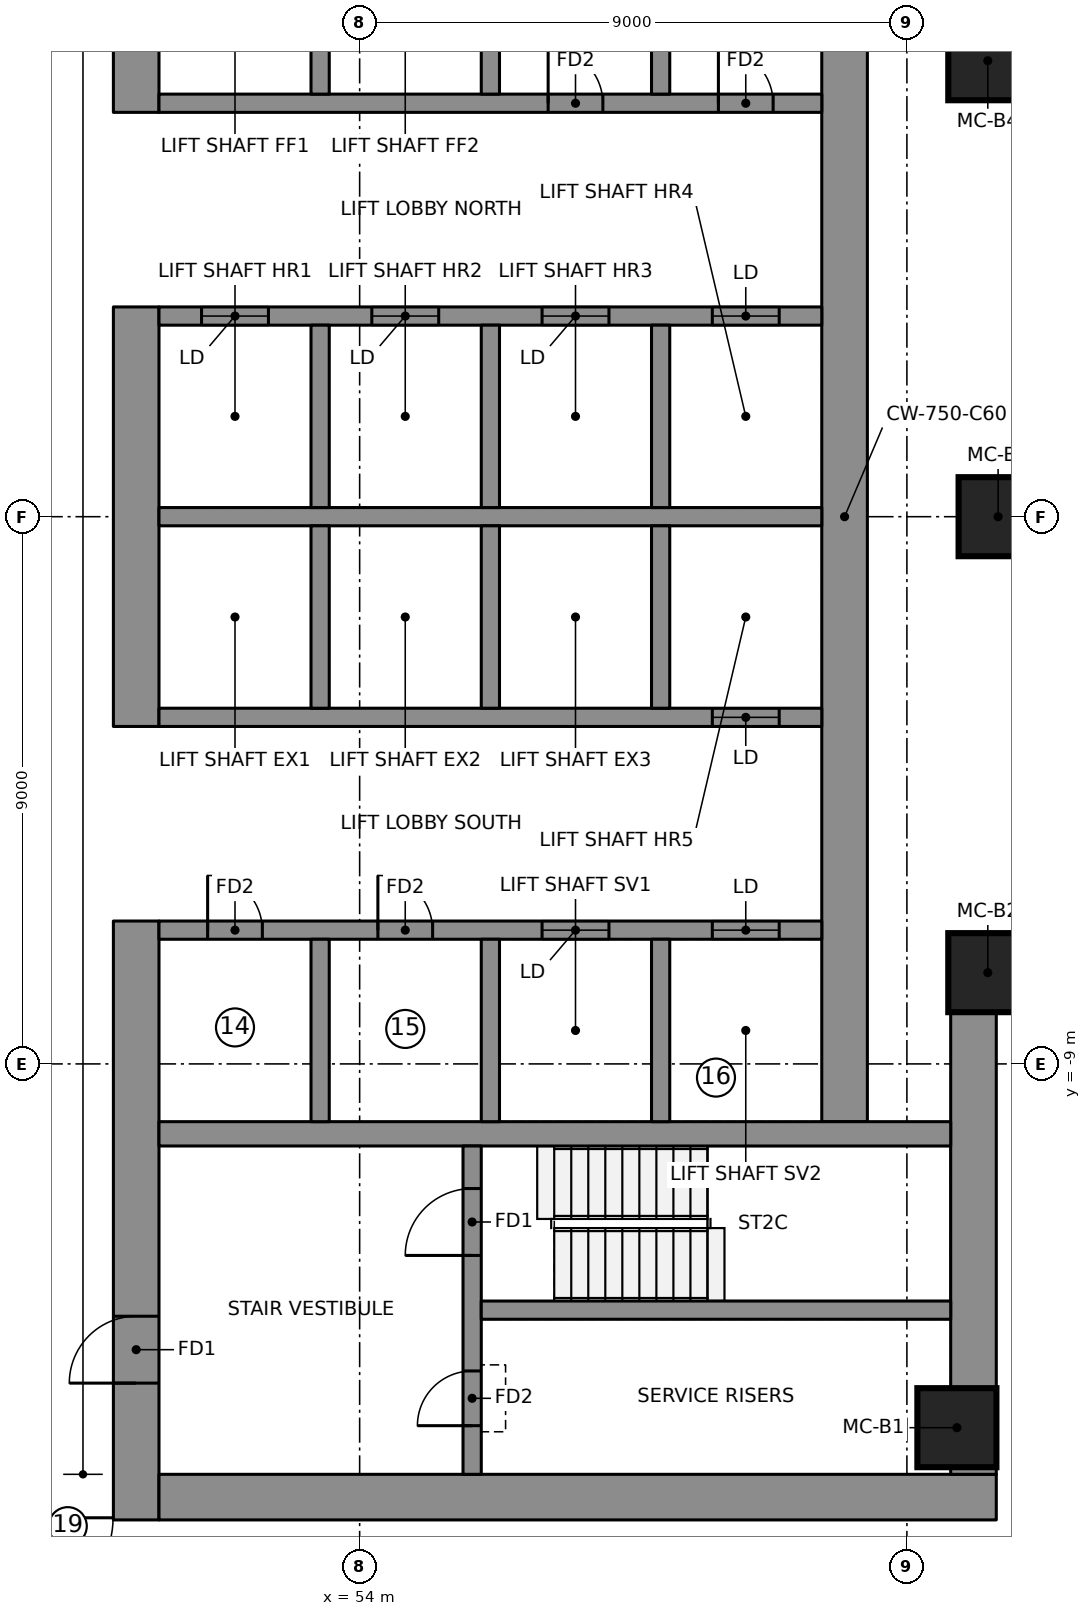
"""IFC4 building model, lengths in metres.
Left out: names, types, materials, properties, quantities, classifications, styles, units other than length and angle.
Written with IfcOpenShell. Run it as: python <this file> out.ifc"""

import sys

from ifc_helpers import new_model, si_unit, direction, frame, frame_2d, origin, origin_2d, place, context, subcontext, project, spatial, rectangle, extrude, element, fill, save


model = new_model("IFC4")
c1 = context("Model", 3, precision=1e-05, world=origin(), true_north=direction((0.0, 1.0)))
c2 = subcontext(c1, "Body", "Model", "MODEL_VIEW")
j1 = project(units=[si_unit("LENGTHUNIT", "METRE"), si_unit("PLANEANGLEUNIT", "RADIAN")], contexts=[c1])
p1 = place(None, origin())
s1 = spatial("IfcSite", under=j1, at=p1, CompositionType="ELEMENT")
p2 = place(p1, origin())
s2 = spatial("IfcBuilding", under=s1, at=p2, CompositionType="ELEMENT")
p3 = place(p2, frame((0.0, 0.0, 186.15)))
s3 = spatial("IfcBuildingStorey", under=s2, at=p3, CompositionType="ELEMENT", Elevation=186.15)
p4 = place(p3, frame((50.325, 6.65, 0.0), z_axis=(0.0, 0.0, 1.0), x_axis=(0.0, 1.0, 0.0)))
e1 = element("IfcWall", 1, at=p4, inside=s3, PredefinedType="SHEAR", context=c2, shape_type="SweptSolid", body=[
    extrude(rectangle(XDim=9.85, YDim=0.75, at=frame_2d((4.925, 0.0))), origin(), (0.0, 0.0, 1.0), 3.55),
])
p5 = place(p4, frame((6.5, 0.0, 0.0)))
e2 = element("IfcOpeningElement", 2, at=p5, cuts=e1, PredefinedType="OPENING", context=c2, shape_type="SweptSolid", body=[
    extrude(rectangle(XDim=1.1, YDim=2.1, at=frame_2d((0.55, 1.05))), frame((0.0, 0.385, 0.0), z_axis=(0.0, -1.0, 0.0), x_axis=(1.0, 0.0, 0.0)), (0.0, 0.0, 1.0), 0.77),
])
p6 = place(p3, frame((50.325, -3.45, 0.0), z_axis=(0.0, 0.0, 1.0), x_axis=(0.0, 1.0, 0.0)))
e3 = element("IfcWall", 3, at=p6, inside=s3, PredefinedType="SHEAR", context=c2, shape_type="SweptSolid", body=[
    extrude(rectangle(XDim=6.9, YDim=0.75, at=frame_2d((3.45, 0.0))), origin(), (0.0, 0.0, 1.0), 3.55),
])
p7 = place(p3, frame((50.325, -16.5, 0.0), z_axis=(0.0, 0.0, 1.0), x_axis=(0.0, 1.0, 0.0)))
e4 = element("IfcWall", 4, at=p7, inside=s3, PredefinedType="SHEAR", context=c2, shape_type="SweptSolid", body=[
    extrude(rectangle(XDim=9.85, YDim=0.75, at=frame_2d((4.925, 0.0))), origin(), (0.0, 0.0, 1.0), 3.55),
])
p8 = place(p7, frame((2.25, 0.0, 0.0)))
e5 = element("IfcOpeningElement", 5, at=p8, cuts=e4, PredefinedType="OPENING", context=c2, shape_type="SweptSolid", body=[
    extrude(rectangle(XDim=1.1, YDim=2.1, at=frame_2d((0.55, 1.05))), frame((0.0, 0.385, 0.0), z_axis=(0.0, -1.0, 0.0), x_axis=(1.0, 0.0, 0.0)), (0.0, 0.0, 1.0), 0.77),
])
p9 = place(p3, frame((50.7, -16.125, 0.0), z_axis=(0.0, 0.0, 1.0), x_axis=(1.0, 0.0, 0.0)))
e6 = element("IfcWall", 6, at=p9, inside=s3, PredefinedType="SHEAR", context=c2, shape_type="SweptSolid", body=[
    extrude(rectangle(XDim=13.77, YDim=0.75, at=frame_2d((6.885, 0.0))), origin(), (0.0, 0.0, 1.0), 3.55),
])
p10 = place(p3, frame((64.095, -15.75, 0.0), z_axis=(0.0, 0.0, 1.0), x_axis=(0.0, 1.0, 0.0)))
e7 = element("IfcWall", 7, at=p10, inside=s3, PredefinedType="SHEAR", context=c2, shape_type="SweptSolid", body=[
    extrude(rectangle(XDim=7.651, YDim=0.75, at=frame_2d((3.825, 0.0))), origin(), (0.0, 0.0, 1.0), 3.55),
])
p11 = place(p3, frame((61.975, -9.95, 0.0), z_axis=(0.0, 0.0, 1.0), x_axis=(0.0, 1.0, 0.0)))
e8 = element("IfcWall", 8, at=p11, inside=s3, PredefinedType="SHEAR", context=c2, shape_type="SweptSolid", body=[
    extrude(rectangle(XDim=19.9, YDim=0.75, at=frame_2d((9.95, 0.0))), origin(), (0.0, 0.0, 1.0), 3.55),
])
p12 = place(p3, frame((50.7, -10.15, 0.0), z_axis=(0.0, 0.0, 1.0), x_axis=(1.0, 0.0, 0.0)))
e9 = element("IfcWall", 9, at=p12, inside=s3, PredefinedType="SHEAR", context=c2, shape_type="SweptSolid", body=[
    extrude(rectangle(XDim=13.02, YDim=0.4, at=frame_2d((6.51, 0.0))), origin(), (0.0, 0.0, 1.0), 3.55),
])
p13 = place(p3, frame((50.7, 0.0, 0.0), z_axis=(0.0, 0.0, 1.0), x_axis=(1.0, 0.0, 0.0)))
e10 = element("IfcWall", 10, at=p13, inside=s3, PredefinedType="SHEAR", context=c2, shape_type="SweptSolid", body=[
    extrude(rectangle(XDim=10.9, YDim=0.3, at=frame_2d((5.45, 0.0))), origin(), (0.0, 0.0, 1.0), 3.55),
])
p14 = place(p3, frame((50.7, 3.3, 0.0), z_axis=(0.0, 0.0, 1.0), x_axis=(1.0, 0.0, 0.0)))
e11 = element("IfcWall", 11, at=p14, inside=s3, PredefinedType="SHEAR", context=c2, shape_type="SweptSolid", body=[
    extrude(rectangle(XDim=10.9, YDim=0.3, at=frame_2d((5.45, 0.0))), origin(), (0.0, 0.0, 1.0), 3.55),
])
p15 = place(p14, frame((0.7, 0.0, 0.0)))
e12 = element("IfcOpeningElement", 12, at=p15, cuts=e11, PredefinedType="OPENING", context=c2, shape_type="SweptSolid", body=[
    extrude(rectangle(XDim=1.1, YDim=2.1, at=frame_2d((0.55, 1.05))), frame((0.0, 0.16, 0.0), z_axis=(0.0, -1.0, 0.0), x_axis=(1.0, 0.0, 0.0)), (0.0, 0.0, 1.0), 0.32),
])
p16 = place(p14, frame((3.5, 0.0, 0.0)))
e13 = element("IfcOpeningElement", 13, at=p16, cuts=e11, PredefinedType="OPENING", context=c2, shape_type="SweptSolid", body=[
    extrude(rectangle(XDim=1.1, YDim=2.1, at=frame_2d((0.55, 1.05))), frame((0.0, 0.16, 0.0), z_axis=(0.0, -1.0, 0.0), x_axis=(1.0, 0.0, 0.0)), (0.0, 0.0, 1.0), 0.32),
])
p17 = place(p14, frame((6.3, 0.0, 0.0)))
e14 = element("IfcOpeningElement", 14, at=p17, cuts=e11, PredefinedType="OPENING", context=c2, shape_type="SweptSolid", body=[
    extrude(rectangle(XDim=1.1, YDim=2.1, at=frame_2d((0.55, 1.05))), frame((0.0, 0.16, 0.0), z_axis=(0.0, -1.0, 0.0), x_axis=(1.0, 0.0, 0.0)), (0.0, 0.0, 1.0), 0.32),
])
p18 = place(p14, frame((9.1, 0.0, 0.0)))
e15 = element("IfcOpeningElement", 15, at=p18, cuts=e11, PredefinedType="OPENING", context=c2, shape_type="SweptSolid", body=[
    extrude(rectangle(XDim=1.1, YDim=2.1, at=frame_2d((0.55, 1.05))), frame((0.0, 0.16, 0.0), z_axis=(0.0, -1.0, 0.0), x_axis=(1.0, 0.0, 0.0)), (0.0, 0.0, 1.0), 0.32),
])
p19 = place(p3, frame((50.7, 6.8, 0.0), z_axis=(0.0, 0.0, 1.0), x_axis=(1.0, 0.0, 0.0)))
e16 = element("IfcWall", 16, at=p19, inside=s3, PredefinedType="SHEAR", context=c2, shape_type="SweptSolid", body=[
    extrude(rectangle(XDim=10.9, YDim=0.3, at=frame_2d((5.45, 0.0))), origin(), (0.0, 0.0, 1.0), 3.55),
])
p20 = place(p19, frame((6.4, 0.0, 0.0)))
e17 = element("IfcOpeningElement", 17, at=p20, cuts=e16, PredefinedType="OPENING", context=c2, shape_type="SweptSolid", body=[
    extrude(rectangle(XDim=0.9, YDim=2.1, at=frame_2d((0.45, 1.05))), frame((0.0, 0.16, 0.0), z_axis=(0.0, -1.0, 0.0), x_axis=(1.0, 0.0, 0.0)), (0.0, 0.0, 1.0), 0.32),
])
p21 = place(p19, frame((9.2, 0.0, 0.0)))
e18 = element("IfcOpeningElement", 18, at=p21, cuts=e16, PredefinedType="OPENING", context=c2, shape_type="SweptSolid", body=[
    extrude(rectangle(XDim=0.9, YDim=2.1, at=frame_2d((0.45, 1.05))), frame((0.0, 0.16, 0.0), z_axis=(0.0, -1.0, 0.0), x_axis=(1.0, 0.0, 0.0)), (0.0, 0.0, 1.0), 0.32),
])
for number, where, z_axis, x_axis in (
    (19, (53.35, 0.15, 0.0), (0.0, 0.0, 1.0), (0.0, 1.0, 0.0)),
    (20, (53.35, 6.95, 0.0), (0.0, 0.0, 1.0), (0.0, 1.0, 0.0)),
    (21, (56.15, 0.15, 0.0), (0.0, 0.0, 1.0), (0.0, 1.0, 0.0)),
    (22, (56.15, 6.95, 0.0), (0.0, 0.0, 1.0), (0.0, 1.0, 0.0)),
    (23, (58.95, 0.15, 0.0), (0.0, 0.0, 1.0), (0.0, 1.0, 0.0)),
    (24, (58.95, 6.95, 0.0), (0.0, 0.0, 1.0), (0.0, 1.0, 0.0)),
):
    element("IfcWall", number, at=place(p3, frame(where, z_axis=z_axis, x_axis=x_axis)), inside=s3, PredefinedType="SHEAR", context=c2, shape_type="SweptSolid", body=[
        extrude(rectangle(XDim=3.0, YDim=0.3, at=frame_2d((1.5, 0.0))), origin(), (0.0, 0.0, 1.0), 3.55),
    ])
p22 = place(p3, frame((50.7, -3.3, 0.0), z_axis=(0.0, 0.0, 1.0), x_axis=(1.0, 0.0, 0.0)))
e25 = element("IfcWall", 25, at=p22, inside=s3, PredefinedType="SHEAR", context=c2, shape_type="SweptSolid", body=[
    extrude(rectangle(XDim=10.9, YDim=0.3, at=frame_2d((5.45, 0.0))), origin(), (0.0, 0.0, 1.0), 3.55),
])
p23 = place(p22, frame((9.1, 0.0, 0.0)))
e26 = element("IfcOpeningElement", 26, at=p23, cuts=e25, PredefinedType="OPENING", context=c2, shape_type="SweptSolid", body=[
    extrude(rectangle(XDim=1.1, YDim=2.1, at=frame_2d((0.55, 1.05))), frame((0.0, 0.16, 0.0), z_axis=(0.0, -1.0, 0.0), x_axis=(1.0, 0.0, 0.0)), (0.0, 0.0, 1.0), 0.32),
])
p24 = place(p3, frame((50.7, -6.8, 0.0), z_axis=(0.0, 0.0, 1.0), x_axis=(1.0, 0.0, 0.0)))
e27 = element("IfcWall", 27, at=p24, inside=s3, PredefinedType="SHEAR", context=c2, shape_type="SweptSolid", body=[
    extrude(rectangle(XDim=10.9, YDim=0.3, at=frame_2d((5.45, 0.0))), origin(), (0.0, 0.0, 1.0), 3.55),
])
p25 = place(p24, frame((6.3, 0.0, 0.0)))
e28 = element("IfcOpeningElement", 28, at=p25, cuts=e27, PredefinedType="OPENING", context=c2, shape_type="SweptSolid", body=[
    extrude(rectangle(XDim=1.1, YDim=2.1, at=frame_2d((0.55, 1.05))), frame((0.0, 0.16, 0.0), z_axis=(0.0, -1.0, 0.0), x_axis=(1.0, 0.0, 0.0)), (0.0, 0.0, 1.0), 0.32),
])
p26 = place(p24, frame((9.1, 0.0, 0.0)))
e29 = element("IfcOpeningElement", 29, at=p26, cuts=e27, PredefinedType="OPENING", context=c2, shape_type="SweptSolid", body=[
    extrude(rectangle(XDim=1.1, YDim=2.1, at=frame_2d((0.55, 1.05))), frame((0.0, 0.16, 0.0), z_axis=(0.0, -1.0, 0.0), x_axis=(1.0, 0.0, 0.0)), (0.0, 0.0, 1.0), 0.32),
])
p27 = place(p24, frame((0.8, 0.0, 0.0)))
e30 = element("IfcOpeningElement", 30, at=p27, cuts=e27, PredefinedType="OPENING", context=c2, shape_type="SweptSolid", body=[
    extrude(rectangle(XDim=0.9, YDim=2.1, at=frame_2d((0.45, 1.05))), frame((0.0, 0.16, 0.0), z_axis=(0.0, -1.0, 0.0), x_axis=(1.0, 0.0, 0.0)), (0.0, 0.0, 1.0), 0.32),
])
p28 = place(p24, frame((3.6, 0.0, 0.0)))
e31 = element("IfcOpeningElement", 31, at=p28, cuts=e27, PredefinedType="OPENING", context=c2, shape_type="SweptSolid", body=[
    extrude(rectangle(XDim=0.9, YDim=2.1, at=frame_2d((0.45, 1.05))), frame((0.0, 0.16, 0.0), z_axis=(0.0, -1.0, 0.0), x_axis=(1.0, 0.0, 0.0)), (0.0, 0.0, 1.0), 0.32),
])
for number, where, z_axis, x_axis in (
    (32, (53.35, -3.15, 0.0), (0.0, 0.0, 1.0), (0.0, 1.0, 0.0)),
    (33, (53.35, -9.95, 0.0), (0.0, 0.0, 1.0), (0.0, 1.0, 0.0)),
    (34, (56.15, -3.15, 0.0), (0.0, 0.0, 1.0), (0.0, 1.0, 0.0)),
    (35, (56.15, -9.95, 0.0), (0.0, 0.0, 1.0), (0.0, 1.0, 0.0)),
    (36, (58.95, -3.15, 0.0), (0.0, 0.0, 1.0), (0.0, 1.0, 0.0)),
    (37, (58.95, -9.95, 0.0), (0.0, 0.0, 1.0), (0.0, 1.0, 0.0)),
):
    element("IfcWall", number, at=place(p3, frame(where, z_axis=z_axis, x_axis=x_axis)), inside=s3, PredefinedType="SHEAR", context=c2, shape_type="SweptSolid", body=[
        extrude(rectangle(XDim=3.0, YDim=0.3, at=frame_2d((1.5, 0.0))), origin(), (0.0, 0.0, 1.0), 3.55),
    ])
p29 = place(p3, frame((55.85, -15.75, 0.0), z_axis=(0.0, 0.0, 1.0), x_axis=(0.0, 1.0, 0.0)))
e38 = element("IfcWall", 38, at=p29, inside=s3, PredefinedType="SHEAR", context=c2, shape_type="SweptSolid", body=[
    extrude(rectangle(XDim=5.4, YDim=0.3, at=frame_2d((2.7, 0.0))), origin(), (0.0, 0.0, 1.0), 3.55),
])
p30 = place(p29, frame((3.6, 0.0, 0.0)))
e39 = element("IfcOpeningElement", 39, at=p30, cuts=e38, PredefinedType="OPENING", context=c2, shape_type="SweptSolid", body=[
    extrude(rectangle(XDim=1.1, YDim=2.1, at=frame_2d((0.55, 1.05))), frame((0.0, 0.16, 0.0), z_axis=(0.0, -1.0, 0.0), x_axis=(1.0, 0.0, 0.0)), (0.0, 0.0, 1.0), 0.32),
])
p31 = place(p29, frame((0.8, 0.0, 0.0)))
e40 = element("IfcOpeningElement", 40, at=p31, cuts=e38, PredefinedType="OPENING", context=c2, shape_type="SweptSolid", body=[
    extrude(rectangle(XDim=0.9, YDim=2.1, at=frame_2d((0.45, 1.05))), frame((0.0, 0.16, 0.0), z_axis=(0.0, -1.0, 0.0), x_axis=(1.0, 0.0, 0.0)), (0.0, 0.0, 1.0), 0.32),
])
p32 = place(p3, frame((56.0, -13.05, 0.0), z_axis=(0.0, 0.0, 1.0), x_axis=(1.0, 0.0, 0.0)))
e41 = element("IfcWall", 41, at=p32, inside=s3, PredefinedType="SHEAR", context=c2, shape_type="SweptSolid", body=[
    extrude(rectangle(XDim=7.72, YDim=0.3, at=frame_2d((3.86, 0.0))), origin(), (0.0, 0.0, 1.0), 3.55),
])
for number, where, z_axis, x_axis in (
    (42, (63.822, -14.983, 0.0), (0.0, 0.0, 1.0), (1.0, 0.0, 0.0)),
    (43, (64.33, -7.499, 0.0), (0.0, 0.0, 1.0), (1.0, 0.0, 0.0)),
    (44, (64.5, 0.0, 0.0), (0.0, 0.0, 1.0), (1.0, 0.0, 0.0)),
    (45, (64.33, 7.499, 0.0), (0.0, 0.0, 1.0), (1.0, 0.0, 0.0)),
):
    element("IfcColumn", number, at=place(p3, frame(where, z_axis=z_axis, x_axis=x_axis)), inside=s3, PredefinedType="COLUMN", context=c2, shape_type="SweptSolid", body=[
        extrude(rectangle(XDim=1.3, YDim=1.3, at=origin_2d()), origin(), (0.0, 0.0, 1.0), 3.55),
    ])
p33 = place(p15, origin())
e46 = element("IfcDoor", 46, at=p33, inside=s3, OperationType="DOUBLE_DOOR_SLIDING", PredefinedType="DOOR", context=c2, shape_type="SweptSolid", body=[
    extrude(rectangle(XDim=1.1, YDim=2.1, at=frame_2d((0.55, 1.05))), frame((0.0, 0.025, 0.0), z_axis=(0.0, -1.0, 0.0), x_axis=(1.0, 0.0, 0.0)), (0.0, 0.0, 1.0), 0.05),
])
fill(e12, e46)
p34 = place(p16, origin())
e47 = element("IfcDoor", 47, at=p34, inside=s3, OperationType="DOUBLE_DOOR_SLIDING", PredefinedType="DOOR", context=c2, shape_type="SweptSolid", body=[
    extrude(rectangle(XDim=1.1, YDim=2.1, at=frame_2d((0.55, 1.05))), frame((0.0, 0.025, 0.0), z_axis=(0.0, -1.0, 0.0), x_axis=(1.0, 0.0, 0.0)), (0.0, 0.0, 1.0), 0.05),
])
fill(e13, e47)
p35 = place(p17, origin())
e48 = element("IfcDoor", 48, at=p35, inside=s3, OperationType="DOUBLE_DOOR_SLIDING", PredefinedType="DOOR", context=c2, shape_type="SweptSolid", body=[
    extrude(rectangle(XDim=1.1, YDim=2.1, at=frame_2d((0.55, 1.05))), frame((0.0, 0.025, 0.0), z_axis=(0.0, -1.0, 0.0), x_axis=(1.0, 0.0, 0.0)), (0.0, 0.0, 1.0), 0.05),
])
fill(e14, e48)
p36 = place(p18, origin())
e49 = element("IfcDoor", 49, at=p36, inside=s3, OperationType="DOUBLE_DOOR_SLIDING", PredefinedType="DOOR", context=c2, shape_type="SweptSolid", body=[
    extrude(rectangle(XDim=1.1, YDim=2.1, at=frame_2d((0.55, 1.05))), frame((0.0, 0.025, 0.0), z_axis=(0.0, -1.0, 0.0), x_axis=(1.0, 0.0, 0.0)), (0.0, 0.0, 1.0), 0.05),
])
fill(e15, e49)
p37 = place(p23, origin())
e50 = element("IfcDoor", 50, at=p37, inside=s3, OperationType="DOUBLE_DOOR_SLIDING", PredefinedType="DOOR", context=c2, shape_type="SweptSolid", body=[
    extrude(rectangle(XDim=1.1, YDim=2.1, at=frame_2d((0.55, 1.05))), frame((0.0, 0.025, 0.0), z_axis=(0.0, -1.0, 0.0), x_axis=(1.0, 0.0, 0.0)), (0.0, 0.0, 1.0), 0.05),
])
fill(e26, e50)
p38 = place(p25, origin())
e51 = element("IfcDoor", 51, at=p38, inside=s3, OperationType="DOUBLE_DOOR_SLIDING", PredefinedType="DOOR", context=c2, shape_type="SweptSolid", body=[
    extrude(rectangle(XDim=1.1, YDim=2.1, at=frame_2d((0.55, 1.05))), frame((0.0, 0.025, 0.0), z_axis=(0.0, -1.0, 0.0), x_axis=(1.0, 0.0, 0.0)), (0.0, 0.0, 1.0), 0.05),
])
fill(e28, e51)
p39 = place(p26, origin())
e52 = element("IfcDoor", 52, at=p39, inside=s3, OperationType="DOUBLE_DOOR_SLIDING", PredefinedType="DOOR", context=c2, shape_type="SweptSolid", body=[
    extrude(rectangle(XDim=1.1, YDim=2.1, at=frame_2d((0.55, 1.05))), frame((0.0, 0.025, 0.0), z_axis=(0.0, -1.0, 0.0), x_axis=(1.0, 0.0, 0.0)), (0.0, 0.0, 1.0), 0.05),
])
fill(e29, e52)
p40 = place(p30, origin())
e53 = element("IfcDoor", 53, at=p40, inside=s3, OperationType="SINGLE_SWING_RIGHT", PredefinedType="DOOR", context=c2, shape_type="SweptSolid", body=[
    extrude(rectangle(XDim=1.1, YDim=2.1, at=frame_2d((0.55, 1.05))), frame((0.0, 0.025, 0.0), z_axis=(0.0, -1.0, 0.0), x_axis=(1.0, 0.0, 0.0)), (0.0, 0.0, 1.0), 0.05),
])
fill(e39, e53)
p41 = place(p8, origin())
e54 = element("IfcDoor", 54, at=p41, inside=s3, OperationType="SINGLE_SWING_RIGHT", PredefinedType="DOOR", context=c2, shape_type="SweptSolid", body=[
    extrude(rectangle(XDim=1.1, YDim=2.1, at=frame_2d((0.55, 1.05))), frame((0.0, 0.025, 0.0), z_axis=(0.0, -1.0, 0.0), x_axis=(1.0, 0.0, 0.0)), (0.0, 0.0, 1.0), 0.05),
])
fill(e5, e54)
p42 = place(p31, origin())
e55 = element("IfcDoor", 55, at=p42, inside=s3, OperationType="SINGLE_SWING_LEFT", PredefinedType="DOOR", context=c2, shape_type="SweptSolid", body=[
    extrude(rectangle(XDim=0.9, YDim=2.1, at=frame_2d((0.45, 1.05))), frame((0.0, 0.025, 0.0), z_axis=(0.0, -1.0, 0.0), x_axis=(1.0, 0.0, 0.0)), (0.0, 0.0, 1.0), 0.05),
])
fill(e40, e55)
p43 = place(p20, origin())
e56 = element("IfcDoor", 56, at=p43, inside=s3, OperationType="SINGLE_SWING_LEFT", PredefinedType="DOOR", context=c2, shape_type="SweptSolid", body=[
    extrude(rectangle(XDim=0.9, YDim=2.1, at=frame_2d((0.45, 1.05))), frame((0.0, 0.025, 0.0), z_axis=(0.0, -1.0, 0.0), x_axis=(1.0, 0.0, 0.0)), (0.0, 0.0, 1.0), 0.05),
])
fill(e17, e56)
p44 = place(p21, origin())
e57 = element("IfcDoor", 57, at=p44, inside=s3, OperationType="SINGLE_SWING_LEFT", PredefinedType="DOOR", context=c2, shape_type="SweptSolid", body=[
    extrude(rectangle(XDim=0.9, YDim=2.1, at=frame_2d((0.45, 1.05))), frame((0.0, 0.025, 0.0), z_axis=(0.0, -1.0, 0.0), x_axis=(1.0, 0.0, 0.0)), (0.0, 0.0, 1.0), 0.05),
])
fill(e18, e57)
p45 = place(p27, origin())
e58 = element("IfcDoor", 58, at=p45, inside=s3, OperationType="SINGLE_SWING_LEFT", PredefinedType="DOOR", context=c2, shape_type="SweptSolid", body=[
    extrude(rectangle(XDim=0.9, YDim=2.1, at=frame_2d((0.45, 1.05))), frame((0.0, 0.025, 0.0), z_axis=(0.0, -1.0, 0.0), x_axis=(1.0, 0.0, 0.0)), (0.0, 0.0, 1.0), 0.05),
])
fill(e30, e58)
p46 = place(p28, origin())
e59 = element("IfcDoor", 59, at=p46, inside=s3, OperationType="SINGLE_SWING_LEFT", PredefinedType="DOOR", context=c2, shape_type="SweptSolid", body=[
    extrude(rectangle(XDim=0.9, YDim=2.1, at=frame_2d((0.45, 1.05))), frame((0.0, 0.025, 0.0), z_axis=(0.0, -1.0, 0.0), x_axis=(1.0, 0.0, 0.0)), (0.0, 0.0, 1.0), 0.05),
])
fill(e31, e59)
save(model, sys.argv[1])
